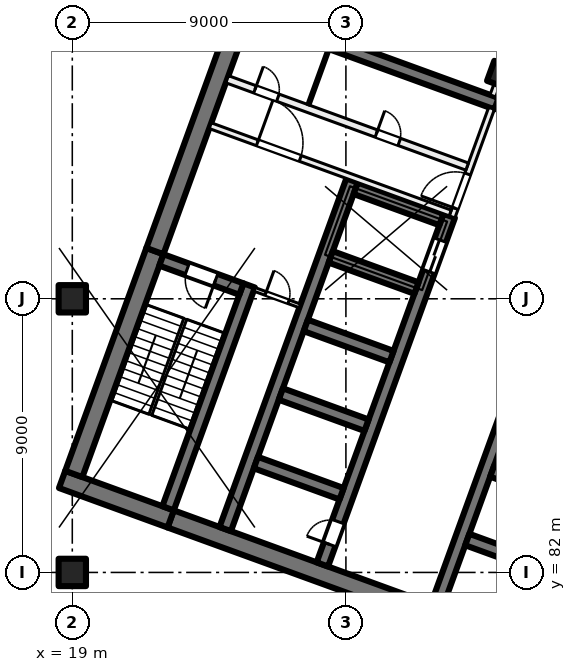
"""IFC4 building model, lengths in metres.
Left out: names, types, materials, properties, quantities, classifications, styles, units other than length and angle.
Written with IfcOpenShell. Run it as: python <this file> out.ifc"""

import sys

from ifc_helpers import new_model, si_unit, direction, frame, frame_2d, origin, origin_2d, place, context, subcontext, project, spatial, rectangle, extrude, element, fill, save


model = new_model("IFC4")
c1 = context("Model", 3, precision=1e-05, world=origin(), true_north=direction((0.0, 1.0)))
c2 = subcontext(c1, "Body", "Model", "MODEL_VIEW")
j1 = project(units=[si_unit("LENGTHUNIT", "METRE"), si_unit("PLANEANGLEUNIT", "RADIAN")], contexts=[c1])
p1 = place(None, origin())
s1 = spatial("IfcSite", under=j1, at=p1, CompositionType="ELEMENT")
p2 = place(p1, origin())
s2 = spatial("IfcBuilding", under=s1, at=p2, CompositionType="ELEMENT")
p3 = place(p2, frame((0.0, 0.0, -4.5)))
s3 = spatial("IfcBuildingStorey", under=s2, at=p3, CompositionType="ELEMENT", Elevation=-4.5)
p4 = place(p3, frame((12.199, 89.809, 0.0), z_axis=(0.0, 0.0, 1.0), x_axis=(0.342018444468, 0.939693239118, 0.0)))
e1 = element("IfcWall", 1, at=p4, inside=s3, PredefinedType="SHEAR", context=c2, shape_type="SweptSolid", body=[
    extrude(rectangle(XDim=47.334, YDim=0.6, at=frame_2d((23.667, 0.0))), origin(), (0.0, 0.0, 1.0), 4.5),
])
for number, where, z_axis, x_axis in (
    (2, (19.0, 82.0, 0.0), (0.0, 0.0, 1.0), (1.0, 0.0, 0.0)),
    (3, (19.0, 91.0, 0.0), (0.0, 0.0, 1.0), (1.0, 0.0, 0.0)),
):
    element("IfcColumn", number, at=place(p3, frame(where, z_axis=z_axis, x_axis=x_axis)), inside=s3, PredefinedType="COLUMN", context=c2, shape_type="SweptSolid", body=[
        extrude(rectangle(XDim=0.9, YDim=0.9, at=origin_2d()), origin(), (0.0, 0.0, 1.0), 4.5),
    ])
p5 = place(p3, frame((33.091, 98.379, 0.0), z_axis=(0.0, 0.0, 1.0), x_axis=(-0.342020143326, -0.939692620786, 0.0)))
e4 = element("IfcColumn", 4, at=p5, inside=s3, PredefinedType="COLUMN", context=c2, shape_type="SweptSolid", body=[
    extrude(rectangle(XDim=0.7, YDim=0.7, at=origin_2d()), origin(), (0.0, 0.0, 1.0), 4.5),
])
p6 = place(p3, frame((35.767, 78.835, 0.0), z_axis=(0.0, 0.0, 1.0), x_axis=(-0.939692894512, 0.342019391267, 0.0)))
e5 = element("IfcWall", 5, at=p6, inside=s3, PredefinedType="SHEAR", context=c2, shape_type="SweptSolid", body=[
    extrude(rectangle(XDim=14.4, YDim=0.6, at=frame_2d((7.2, 0.0))), origin(), (0.0, 0.0, 1.0), 4.5),
])
p7 = place(p3, frame((22.236, 83.76, 0.0), z_axis=(0.0, 0.0, 1.0), x_axis=(-0.939680822529, 0.342052557032, 0.0)))
e6 = element("IfcWall", 6, at=p7, inside=s3, PredefinedType="SHEAR", context=c2, shape_type="SweptSolid", body=[
    extrude(rectangle(XDim=3.8, YDim=0.6, at=frame_2d((1.9, 0.0))), origin(), (0.0, 0.0, 1.0), 4.5),
])
p8 = place(p3, frame((19.05, 85.239, 0.0), z_axis=(0.0, 0.0, 1.0), x_axis=(0.342016982193, 0.939693771338, 0.0)))
e7 = element("IfcWall", 7, at=p8, inside=s3, PredefinedType="SHEAR", context=c2, shape_type="SweptSolid", body=[
    extrude(rectangle(XDim=7.8, YDim=0.6, at=frame_2d((3.9, 0.0))), origin(), (0.0, 0.0, 1.0), 4.5),
])
p9 = place(p3, frame((21.717, 92.568, 0.0), z_axis=(0.0, 0.0, 1.0), x_axis=(0.342016162452, 0.939694069696, 0.0)))
e8 = element("IfcWall", 8, at=p9, inside=s3, PredefinedType="SHEAR", context=c2, shape_type="SweptSolid", body=[
    extrude(rectangle(XDim=8.9, YDim=0.6, at=frame_2d((4.45, 0.0))), origin(), (0.0, 0.0, 1.0), 4.5),
])
p10 = place(p3, frame((22.15, 84.11, 0.0), z_axis=(0.0, 0.0, 1.0), x_axis=(0.342016982193, 0.939693771338, 0.0)))
e9 = element("IfcWall", 9, at=p10, inside=s3, PredefinedType="SHEAR", context=c2, shape_type="SweptSolid", body=[
    extrude(rectangle(XDim=7.8, YDim=0.4, at=frame_2d((3.9, 0.0))), origin(), (0.0, 0.0, 1.0), 4.5),
])
p11 = place(p3, frame((24.562, 91.32, 0.0), z_axis=(0.0, 0.0, 1.0), x_axis=(-0.939717030584, 0.341953070509, 0.0)))
e10 = element("IfcWall", 10, at=p11, inside=s3, PredefinedType="SHEAR", context=c2, shape_type="SweptSolid", body=[
    extrude(rectangle(XDim=2.8, YDim=0.4, at=frame_2d((1.4, 0.0))), origin(), (0.0, 0.0, 1.0), 4.5),
])
p12 = place(p11, frame((0.9, 0.0, 0.0)))
e11 = element("IfcOpeningElement", 11, at=p12, cuts=e10, PredefinedType="OPENING", context=c2, shape_type="SweptSolid", body=[
    extrude(rectangle(XDim=1.0, YDim=2.1, at=frame_2d((0.5, 1.05))), frame((0.0, 0.21, 0.0), z_axis=(0.0, -1.0, 0.0), x_axis=(1.0, 0.0, 0.0)), (0.0, 0.0, 1.0), 0.42),
])
p13 = place(p3, frame((30.984, 80.895, 0.0), z_axis=(0.0, 0.0, 1.0), x_axis=(0.342021021735, 0.939692301071, 0.0)))
e12 = element("IfcWall", 12, at=p13, inside=s3, PredefinedType="SHEAR", context=c2, shape_type="SweptSolid", body=[
    extrude(rectangle(XDim=12.2, YDim=0.4, at=frame_2d((6.1, 0.0))), origin(), (0.0, 0.0, 1.0), 4.5),
])
for number, where, z_axis, x_axis in (
    (13, (34.812, 82.056, 0.0), (0.0, 0.0, 1.0), (-0.94, 0.342, 0.0)),
    (14, (35.632, 84.311, 0.0), (0.0, 0.0, 1.0), (-0.94, 0.342, 0.0)),
):
    element("IfcWall", number, at=place(p3, frame(where, z_axis=z_axis, x_axis=x_axis)), inside=s3, PredefinedType="SHEAR", context=c2, shape_type="SweptSolid", body=[
        extrude(rectangle(XDim=3.0, YDim=0.4, at=frame_2d((1.5, 0.0))), origin(), (0.0, 0.0, 1.0), 4.5),
    ])
p14 = place(p3, frame((27.225, 82.263, 0.0), z_axis=(0.0, 0.0, 1.0), x_axis=(0.342014590177, 0.939694641948, 0.0)))
e15 = element("IfcWall", 15, at=p14, inside=s3, PredefinedType="SHEAR", context=c2, shape_type="SweptSolid", body=[
    extrude(rectangle(XDim=12.2, YDim=0.4, at=frame_2d((6.1, 0.0))), origin(), (0.0, 0.0, 1.0), 4.5),
])
p15 = place(p14, frame((10.25, 0.0, 0.0)))
e16 = element("IfcOpeningElement", 16, at=p15, cuts=e15, PredefinedType="OPENING", context=c2, shape_type="SweptSolid", body=[
    extrude(rectangle(XDim=1.1, YDim=2.1, at=frame_2d((0.55, 1.05))), frame((0.0, 0.21, 0.0), z_axis=(0.0, -1.0, 0.0), x_axis=(1.0, 0.0, 0.0)), (0.0, 0.0, 1.0), 0.42),
])
p16 = place(p14, frame((0.7, 0.0, 0.0)))
e17 = element("IfcOpeningElement", 17, at=p16, cuts=e15, PredefinedType="OPENING", context=c2, shape_type="SweptSolid", body=[
    extrude(rectangle(XDim=0.8, YDim=2.1, at=frame_2d((0.4, 1.05))), frame((0.0, 0.21, 0.0), z_axis=(0.0, -1.0, 0.0), x_axis=(1.0, 0.0, 0.0)), (0.0, 0.0, 1.0), 0.42),
])
p17 = place(p3, frame((24.03, 83.426, 0.0), z_axis=(0.0, 0.0, 1.0), x_axis=(0.342014590177, 0.939694641948, 0.0)))
e18 = element("IfcWall", 18, at=p17, inside=s3, PredefinedType="SHEAR", context=c2, shape_type="SweptSolid", body=[
    extrude(rectangle(XDim=12.2, YDim=0.4, at=frame_2d((6.1, 0.0))), origin(), (0.0, 0.0, 1.0), 4.5),
])
p18 = place(p3, frame((27.858, 84.587, 0.0), z_axis=(0.0, 0.0, 1.0), x_axis=(-0.939686455819, 0.342037080957, 0.0)))
e19 = element("IfcWall", 19, at=p18, inside=s3, PredefinedType="SHEAR", context=c2, shape_type="SweptSolid", body=[
    extrude(rectangle(XDim=3.0, YDim=0.4, at=frame_2d((1.5, 0.0))), origin(), (0.0, 0.0, 1.0), 4.5),
])
p19 = place(p3, frame((28.678, 86.842, 0.0), z_axis=(0.0, 0.0, 1.0), x_axis=(-0.939676934218, 0.342063238742, 0.0)))
e20 = element("IfcWall", 20, at=p19, inside=s3, PredefinedType="SHEAR", context=c2, shape_type="SweptSolid", body=[
    extrude(rectangle(XDim=3.0, YDim=0.4, at=frame_2d((1.5, 0.0))), origin(), (0.0, 0.0, 1.0), 4.5),
])
for number, where, z_axis, x_axis in (
    (21, (29.5, 89.097, 0.0), (0.0, 0.0, 1.0), (-0.94, 0.342, 0.0)),
    (22, (30.32, 91.353, 0.0), (0.0, 0.0, 1.0), (-0.94, 0.342, 0.0)),
    (23, (31.141, 93.608, 0.0), (0.0, 0.0, 1.0), (-0.94, 0.342, 0.0)),
):
    element("IfcWall", number, at=place(p3, frame(where, z_axis=z_axis, x_axis=x_axis)), inside=s3, PredefinedType="SHEAR", context=c2, shape_type="SweptSolid", body=[
        extrude(rectangle(XDim=3.0, YDim=0.4, at=frame_2d((1.5, 0.0))), origin(), (0.0, 0.0, 1.0), 4.5),
    ])
p20 = place(p3, frame((32.953, 97.418, 0.0), z_axis=(0.0, 0.0, 1.0), x_axis=(-0.93969060187, 0.342025690201, 0.0)))
e24 = element("IfcWall", 24, at=p20, inside=s3, PredefinedType="SHEAR", context=c2, shape_type="SweptSolid", body=[
    extrude(rectangle(XDim=8.6, YDim=0.4, at=frame_2d((4.3, 0.0))), origin(), (0.0, 0.0, 1.0), 4.5),
])
p21 = place(p3, frame((31.491, 93.693, 0.0), z_axis=(0.0, 0.0, 1.0), x_axis=(0.341995824804, 0.939701471648, 0.0)))
e25 = element("IfcWall", 25, at=p21, inside=s3, PredefinedType="PARTITIONING", context=c2, shape_type="SweptSolid", body=[
    extrude(rectangle(XDim=3.8, YDim=0.2, at=frame_2d((1.9, 0.0))), origin(), (0.0, 0.0, 1.0), 4.1),
])
p22 = place(p21, frame((0.3, 0.0, 0.0)))
e26 = element("IfcOpeningElement", 26, at=p22, cuts=e25, PredefinedType="OPENING", context=c2, shape_type="SweptSolid", body=[
    extrude(rectangle(XDim=1.2, YDim=2.1, at=frame_2d((0.6, 1.05))), frame((0.0, 0.11, 0.0), z_axis=(0.0, -1.0, 0.0), x_axis=(1.0, 0.0, 0.0)), (0.0, 0.0, 1.0), 0.22),
])
p23 = place(p3, frame((23.538, 96.694, 0.0), z_axis=(0.0, 0.0, 1.0), x_axis=(0.939691552312, -0.342023078919, 0.0)))
e27 = element("IfcWall", 27, at=p23, inside=s3, PredefinedType="PARTITIONING", context=c2, shape_type="SweptSolid", body=[
    extrude(rectangle(XDim=8.4, YDim=0.2, at=frame_2d((4.2, 0.0))), origin(), (0.0, 0.0, 1.0), 4.1),
])
p24 = place(p23, frame((1.65, 0.0, 0.0)))
e28 = element("IfcOpeningElement", 28, at=p24, cuts=e27, PredefinedType="OPENING", context=c2, shape_type="SweptSolid", body=[
    extrude(rectangle(XDim=1.5, YDim=2.1, at=frame_2d((0.75, 1.05))), frame((0.0, 0.11, 0.0), z_axis=(0.0, -1.0, 0.0), x_axis=(1.0, 0.0, 0.0)), (0.0, 0.0, 1.0), 0.22),
])
p25 = place(p3, frame((24.094, 98.221, 0.0), z_axis=(0.0, 0.0, 1.0), x_axis=(0.939691552312, -0.342023078919, 0.0)))
e29 = element("IfcWall", 29, at=p25, inside=s3, PredefinedType="PARTITIONING", context=c2, shape_type="SweptSolid", body=[
    extrude(rectangle(XDim=8.4, YDim=0.25, at=frame_2d((4.2, 0.0))), origin(), (0.0, 0.0, 1.0), 4.1),
])
p26 = place(p25, frame((5.225, 0.0, 0.0)))
e30 = element("IfcOpeningElement", 30, at=p26, cuts=e29, PredefinedType="OPENING", context=c2, shape_type="SweptSolid", body=[
    extrude(rectangle(XDim=0.8, YDim=2.1, at=frame_2d((0.4, 1.05))), frame((0.0, 0.135, 0.0), z_axis=(0.0, -1.0, 0.0), x_axis=(1.0, 0.0, 0.0)), (0.0, 0.0, 1.0), 0.27),
])
p27 = place(p25, frame((0.975, 0.0, 0.0)))
e31 = element("IfcOpeningElement", 31, at=p27, cuts=e29, PredefinedType="OPENING", context=c2, shape_type="SweptSolid", body=[
    extrude(rectangle(XDim=0.8, YDim=2.1, at=frame_2d((0.4, 1.05))), frame((0.0, 0.135, 0.0), z_axis=(0.0, -1.0, 0.0), x_axis=(1.0, 0.0, 0.0)), (0.0, 0.0, 1.0), 0.27),
])
p28 = place(p3, frame((24.985, 91.312, 0.0), z_axis=(0.0, 0.0, 1.0), x_axis=(0.939708740826, -0.341975850632, 0.0)))
e32 = element("IfcWall", 32, at=p28, inside=s3, PredefinedType="PARTITIONING", context=c2, shape_type="SweptSolid", body=[
    extrude(rectangle(XDim=1.6, YDim=0.125, at=frame_2d((0.8, 0.0))), origin(), (0.0, 0.0, 1.0), 4.1),
])
p29 = place(p28, frame((0.4, 0.0, 0.0)))
e33 = element("IfcOpeningElement", 33, at=p29, cuts=e32, PredefinedType="OPENING", context=c2, shape_type="SweptSolid", body=[
    extrude(rectangle(XDim=0.8, YDim=2.1, at=frame_2d((0.4, 1.05))), frame((0.0, 0.073, 0.0), z_axis=(0.0, -1.0, 0.0), x_axis=(1.0, 0.0, 0.0)), (0.0, 0.0, 1.0), 0.145),
])
p30 = place(p3, frame((26.768, 97.381, 0.0), z_axis=(0.0, 0.0, 1.0), x_axis=(0.342024501273, 0.939691034611, 0.0)))
e34 = element("IfcWall", 34, at=p30, inside=s3, PredefinedType="PARTITIONING", context=c2, shape_type="SweptSolid", body=[
    extrude(rectangle(XDim=1.95, YDim=0.1, at=frame_2d((0.975, 0.0))), origin(), (0.0, 0.0, 1.0), 4.1),
])
p31 = place(p3, frame((32.834, 97.674, 0.0), z_axis=(0.0, 0.0, 1.0), x_axis=(0.3420218461, 0.939692001025, 0.0)))
e35 = element("IfcWall", 35, at=p31, inside=s3, PredefinedType="PARTITIONING", context=c2, shape_type="SweptSolid", body=[
    extrude(rectangle(XDim=9.0, YDim=0.2, at=frame_2d((4.5, 0.0))), origin(), (0.0, 0.0, 1.0), 4.1),
])
p32 = place(p31, frame((4.002, 0.0, 0.0)))
e36 = element("IfcOpeningElement", 36, at=p32, cuts=e35, PredefinedType="OPENING", context=c2, shape_type="SweptSolid", body=[
    extrude(rectangle(XDim=1.0, YDim=2.1, at=frame_2d((0.5, 1.05))), frame((0.0, 0.11, 0.0), z_axis=(0.0, -1.0, 0.0), x_axis=(1.0, 0.0, 0.0)), (0.0, 0.0, 1.0), 0.22),
])
p33 = place(p15, origin())
e37 = element("IfcDoor", 37, at=p33, inside=s3, OperationType="DOUBLE_DOOR_SLIDING", PredefinedType="DOOR", context=c2, shape_type="SweptSolid", body=[
    extrude(rectangle(XDim=1.1, YDim=2.1, at=frame_2d((0.55, 1.05))), frame((0.0, 0.025, 0.0), z_axis=(0.0, -1.0, 0.0), x_axis=(1.0, 0.0, 0.0)), (0.0, 0.0, 1.0), 0.05),
])
fill(e16, e37)
p34 = place(p16, origin())
e38 = element("IfcDoor", 38, at=p34, inside=s3, OperationType="SINGLE_SWING_LEFT", PredefinedType="DOOR", context=c2, shape_type="SweptSolid", body=[
    extrude(rectangle(XDim=0.8, YDim=2.1, at=frame_2d((0.4, 1.05))), frame((0.0, 0.025, 0.0), z_axis=(0.0, -1.0, 0.0), x_axis=(1.0, 0.0, 0.0)), (0.0, 0.0, 1.0), 0.05),
])
fill(e17, e38)
p35 = place(p22, origin())
e39 = element("IfcDoor", 39, at=p35, inside=s3, OperationType="DOUBLE_DOOR_SINGLE_SWING", PredefinedType="DOOR", context=c2, shape_type="SweptSolid", body=[
    extrude(rectangle(XDim=1.2, YDim=2.1, at=frame_2d((0.6, 1.05))), frame((0.0, 0.025, 0.0), z_axis=(0.0, -1.0, 0.0), x_axis=(1.0, 0.0, 0.0)), (0.0, 0.0, 1.0), 0.05),
])
fill(e26, e39)
p36 = place(p24, origin())
e40 = element("IfcDoor", 40, at=p36, inside=s3, OperationType="DOUBLE_DOOR_SINGLE_SWING", PredefinedType="DOOR", context=c2, shape_type="SweptSolid", body=[
    extrude(rectangle(XDim=1.5, YDim=2.1, at=frame_2d((0.75, 1.05))), frame((0.0, 0.025, 0.0), z_axis=(0.0, -1.0, 0.0), x_axis=(1.0, 0.0, 0.0)), (0.0, 0.0, 1.0), 0.05),
])
fill(e28, e40)
p37 = place(p12, origin())
e41 = element("IfcDoor", 41, at=p37, inside=s3, OperationType="SINGLE_SWING_LEFT", PredefinedType="DOOR", context=c2, shape_type="SweptSolid", body=[
    extrude(rectangle(XDim=1.0, YDim=2.1, at=frame_2d((0.5, 1.05))), frame((0.0, 0.025, 0.0), z_axis=(0.0, -1.0, 0.0), x_axis=(1.0, 0.0, 0.0)), (0.0, 0.0, 1.0), 0.05),
])
fill(e11, e41)
p38 = place(p29, origin())
e42 = element("IfcDoor", 42, at=p38, inside=s3, OperationType="SINGLE_SWING_RIGHT", PredefinedType="DOOR", context=c2, shape_type="SweptSolid", body=[
    extrude(rectangle(XDim=0.8, YDim=2.1, at=frame_2d((0.4, 1.05))), frame((0.0, 0.025, 0.0), z_axis=(0.0, -1.0, 0.0), x_axis=(1.0, 0.0, 0.0)), (0.0, 0.0, 1.0), 0.05),
])
fill(e33, e42)
p39 = place(p26, origin())
e43 = element("IfcDoor", 43, at=p39, inside=s3, OperationType="SINGLE_SWING_LEFT", PredefinedType="DOOR", context=c2, shape_type="SweptSolid", body=[
    extrude(rectangle(XDim=0.8, YDim=2.1, at=frame_2d((0.4, 1.05))), frame((0.0, 0.025, 0.0), z_axis=(0.0, -1.0, 0.0), x_axis=(1.0, 0.0, 0.0)), (0.0, 0.0, 1.0), 0.05),
])
fill(e30, e43)
p40 = place(p27, origin())
e44 = element("IfcDoor", 44, at=p40, inside=s3, OperationType="SINGLE_SWING_RIGHT", PredefinedType="DOOR", context=c2, shape_type="SweptSolid", body=[
    extrude(rectangle(XDim=0.8, YDim=2.1, at=frame_2d((0.4, 1.05))), frame((0.0, 0.025, 0.0), z_axis=(0.0, -1.0, 0.0), x_axis=(1.0, 0.0, 0.0)), (0.0, 0.0, 1.0), 0.05),
])
fill(e31, e44)
save(model, sys.argv[1])
